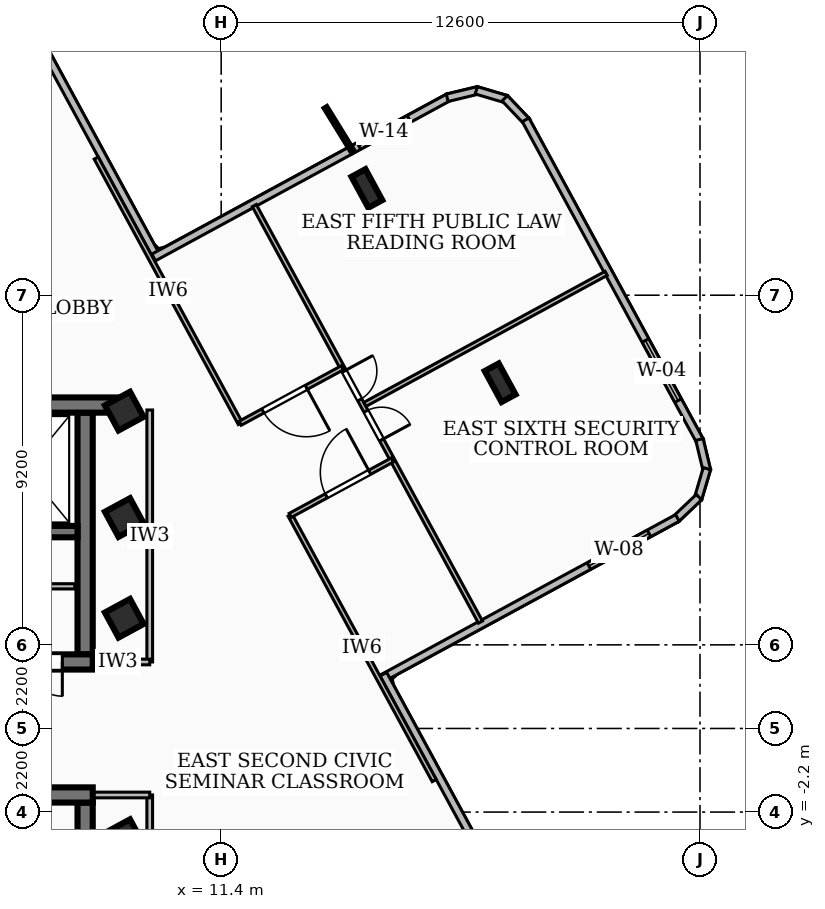
"""IFC4 building model, lengths in metres.
Left out: names, types, materials, properties, quantities, classifications, styles, units other than length and angle.
Written with IfcOpenShell. Run it as: python <this file> out.ifc"""

import sys

from ifc_helpers import new_model, si_unit, direction, frame, frame_2d, origin, origin_2d, place, context, subcontext, project, spatial, rectangle, i_section, extrude, element, fill, save


model = new_model("IFC4")
c1 = context("Model", 3, precision=1e-05, world=origin(), true_north=direction((0.0, 1.0)))
c2 = subcontext(c1, "Body", "Model", "MODEL_VIEW")
j1 = project(units=[si_unit("LENGTHUNIT", "METRE"), si_unit("PLANEANGLEUNIT", "RADIAN")], contexts=[c1])
p1 = place(None, origin())
s1 = spatial("IfcSite", under=j1, at=p1, CompositionType="ELEMENT")
p2 = place(p1, origin())
s2 = spatial("IfcBuilding", under=s1, at=p2, CompositionType="ELEMENT")
p3 = place(p2, frame((0.0, 0.0, 200.88)))
s3 = spatial("IfcBuildingStorey", under=s2, at=p3, CompositionType="ELEMENT", Elevation=200.88)
p4 = place(p3, frame((-8.78, 8.51, 0.0), z_axis=(0.0, 0.0, 1.0), x_axis=(1.0, 0.0, 0.0)))
e1 = element("IfcWall", 1, at=p4, inside=s3, PredefinedType="SHEAR", context=c2, shape_type="SweptSolid", body=[
    extrude(rectangle(XDim=17.56, YDim=0.4, at=frame_2d((8.78, 0.0))), origin(), (0.0, 0.0, 1.0), 4.06),
])
p5 = place(p3, frame((8.02, 1.75, 0.0), z_axis=(0.0, 0.0, 1.0), x_axis=(-1.0, 0.0, 0.0)))
e2 = element("IfcWall", 2, at=p5, inside=s3, PredefinedType="SHEAR", context=c2, shape_type="SweptSolid", body=[
    extrude(rectangle(XDim=16.04, YDim=0.4, at=frame_2d((8.02, 0.0))), origin(), (0.0, 0.0, 1.0), 4.06),
])
p6 = place(p5, frame((7.45, 0.0, 0.0)))
e3 = element("IfcOpeningElement", 3, at=p6, cuts=e2, PredefinedType="OPENING", context=c2, shape_type="SweptSolid", body=[
    extrude(rectangle(XDim=1.0, YDim=2.1, at=frame_2d((0.5, 1.05))), frame((0.0, 0.21, 0.0), z_axis=(0.0, -1.0, 0.0), x_axis=(1.0, 0.0, 0.0)), (0.0, 0.0, 1.0), 0.42),
])
p7 = place(p5, frame((14.285, 0.0, 0.0)))
e4 = element("IfcOpeningElement", 4, at=p7, cuts=e2, PredefinedType="OPENING", context=c2, shape_type="SweptSolid", body=[
    extrude(rectangle(XDim=1.05, YDim=2.15, at=frame_2d((0.525, 1.075))), frame((0.0, 0.21, 0.0), z_axis=(0.0, -1.0, 0.0), x_axis=(1.0, 0.0, 0.0)), (0.0, 0.0, 1.0), 0.42),
])
p8 = place(p5, frame((12.725, 0.0, 0.0)))
e5 = element("IfcOpeningElement", 5, at=p8, cuts=e2, PredefinedType="OPENING", context=c2, shape_type="SweptSolid", body=[
    extrude(rectangle(XDim=1.05, YDim=2.15, at=frame_2d((0.525, 1.075))), frame((0.0, 0.21, 0.0), z_axis=(0.0, -1.0, 0.0), x_axis=(1.0, 0.0, 0.0)), (0.0, 0.0, 1.0), 0.42),
])
p9 = place(p5, frame((11.165, 0.0, 0.0)))
e6 = element("IfcOpeningElement", 6, at=p9, cuts=e2, PredefinedType="OPENING", context=c2, shape_type="SweptSolid", body=[
    extrude(rectangle(XDim=1.05, YDim=2.15, at=frame_2d((0.525, 1.075))), frame((0.0, 0.21, 0.0), z_axis=(0.0, -1.0, 0.0), x_axis=(1.0, 0.0, 0.0)), (0.0, 0.0, 1.0), 0.42),
])
p10 = place(p5, frame((3.85, 0.0, 0.0)))
e7 = element("IfcOpeningElement", 7, at=p10, cuts=e2, PredefinedType="OPENING", context=c2, shape_type="SweptSolid", body=[
    extrude(rectangle(XDim=0.9, YDim=2.06, at=frame_2d((0.45, 1.03))), frame((0.0, 0.21, 0.0), z_axis=(0.0, -1.0, 0.0), x_axis=(1.0, 0.0, 0.0)), (0.0, 0.0, 1.0), 0.42),
])
p11 = place(p5, frame((2.35, 0.0, 0.0)))
e8 = element("IfcOpeningElement", 8, at=p11, cuts=e2, PredefinedType="OPENING", context=c2, shape_type="SweptSolid", body=[
    extrude(rectangle(XDim=0.9, YDim=2.06, at=frame_2d((0.45, 1.03))), frame((0.0, 0.21, 0.0), z_axis=(0.0, -1.0, 0.0), x_axis=(1.0, 0.0, 0.0)), (0.0, 0.0, 1.0), 0.42),
])
p12 = place(p5, frame((0.8, 0.0, 0.0)))
e9 = element("IfcOpeningElement", 9, at=p12, cuts=e2, PredefinedType="OPENING", context=c2, shape_type="SweptSolid", body=[
    extrude(rectangle(XDim=0.9, YDim=2.06, at=frame_2d((0.45, 1.03))), frame((0.0, 0.21, 0.0), z_axis=(0.0, -1.0, 0.0), x_axis=(1.0, 0.0, 0.0)), (0.0, 0.0, 1.0), 0.42),
])
p13 = place(p3, frame((7.82, 8.31, 0.0), z_axis=(0.0, 0.0, 1.0), x_axis=(0.0, -1.0, 0.0)))
e10 = element("IfcWall", 10, at=p13, inside=s3, PredefinedType="SHEAR", context=c2, shape_type="SweptSolid", body=[
    extrude(rectangle(XDim=6.36, YDim=0.4, at=frame_2d((3.18, 0.0))), origin(), (0.0, 0.0, 1.0), 4.06),
])
p14 = place(p3, frame((7.62, 5.18, 0.0), z_axis=(0.0, 0.0, 1.0), x_axis=(-1.0, 0.0, 0.0)))
e11 = element("IfcWall", 11, at=p14, inside=s3, PredefinedType="SOLIDWALL", context=c2, shape_type="SweptSolid", body=[
    extrude(rectangle(XDim=15.24, YDim=0.3, at=frame_2d((7.62, 0.0))), origin(), (0.0, 0.0, 1.0), 4.06),
])
p15 = place(p14, frame((5.77, 0.0, 0.0)))
e12 = element("IfcOpeningElement", 12, at=p15, cuts=e11, PredefinedType="OPENING", context=c2, shape_type="SweptSolid", body=[
    extrude(rectangle(XDim=1.1, YDim=2.15, at=frame_2d((0.55, 1.075))), frame((0.0, 0.16, 0.0), z_axis=(0.0, -1.0, 0.0), x_axis=(1.0, 0.0, 0.0)), (0.0, 0.0, 1.0), 0.32),
])
p16 = place(p14, frame((2.97, 0.0, 0.0)))
e13 = element("IfcOpeningElement", 13, at=p16, cuts=e11, PredefinedType="OPENING", context=c2, shape_type="SweptSolid", body=[
    extrude(rectangle(XDim=1.1, YDim=2.15, at=frame_2d((0.55, 1.075))), frame((0.0, 0.16, 0.0), z_axis=(0.0, -1.0, 0.0), x_axis=(1.0, 0.0, 0.0)), (0.0, 0.0, 1.0), 0.32),
])
p17 = place(p14, frame((7.97, 0.0, 0.0)))
e14 = element("IfcOpeningElement", 14, at=p17, cuts=e11, PredefinedType="OPENING", context=c2, shape_type="SweptSolid", body=[
    extrude(rectangle(XDim=1.0, YDim=2.1, at=frame_2d((0.5, 1.05))), frame((0.0, 0.16, 0.0), z_axis=(0.0, -1.0, 0.0), x_axis=(1.0, 0.0, 0.0)), (0.0, 0.0, 1.0), 0.32),
])
p18 = place(p3, frame((-8.02, -1.75, 0.0), z_axis=(0.0, 0.0, 1.0), x_axis=(1.0, 0.0, 0.0)))
e15 = element("IfcWall", 15, at=p18, inside=s3, PredefinedType="SHEAR", context=c2, shape_type="SweptSolid", body=[
    extrude(rectangle(XDim=16.04, YDim=0.4, at=frame_2d((8.02, 0.0))), origin(), (0.0, 0.0, 1.0), 4.06),
])
p19 = place(p18, frame((7.45, 0.0, 0.0)))
e16 = element("IfcOpeningElement", 16, at=p19, cuts=e15, PredefinedType="OPENING", context=c2, shape_type="SweptSolid", body=[
    extrude(rectangle(XDim=1.0, YDim=2.1, at=frame_2d((0.5, 1.05))), frame((0.0, 0.21, 0.0), z_axis=(0.0, -1.0, 0.0), x_axis=(1.0, 0.0, 0.0)), (0.0, 0.0, 1.0), 0.42),
])
p20 = place(p18, frame((12.65, 0.0, 0.0)))
e17 = element("IfcOpeningElement", 17, at=p20, cuts=e15, PredefinedType="OPENING", context=c2, shape_type="SweptSolid", body=[
    extrude(rectangle(XDim=0.9, YDim=2.06, at=frame_2d((0.45, 1.03))), frame((0.0, 0.21, 0.0), z_axis=(0.0, -1.0, 0.0), x_axis=(1.0, 0.0, 0.0)), (0.0, 0.0, 1.0), 0.42),
])
p21 = place(p18, frame((2.25, 0.0, 0.0)))
e18 = element("IfcOpeningElement", 18, at=p21, cuts=e15, PredefinedType="OPENING", context=c2, shape_type="SweptSolid", body=[
    extrude(rectangle(XDim=0.9, YDim=2.06, at=frame_2d((0.45, 1.03))), frame((0.0, 0.21, 0.0), z_axis=(0.0, -1.0, 0.0), x_axis=(1.0, 0.0, 0.0)), (0.0, 0.0, 1.0), 0.42),
])
p22 = place(p3, frame((7.82, -1.95, 0.0), z_axis=(0.0, 0.0, 1.0), x_axis=(0.0, -1.0, 0.0)))
e19 = element("IfcWall", 19, at=p22, inside=s3, PredefinedType="SHEAR", context=c2, shape_type="SweptSolid", body=[
    extrude(rectangle(XDim=6.36, YDim=0.4, at=frame_2d((3.18, 0.0))), origin(), (0.0, 0.0, 1.0), 4.06),
])
for number, where, z_axis, x_axis in (
    (20, (8.85, -2.9, 0.0), (0.0, 0.0, 1.0), (0.879, 0.477, 0.0)),
    (21, (8.85, 2.9, 0.0), (0.0, 0.0, 1.0), (0.879, 0.477, 0.0)),
    (22, (8.85, 5.55, 0.0), (0.0, 0.0, 1.0), (0.879, 0.477, 0.0)),
    (23, (8.85, 8.35, 0.0), (0.0, 0.0, 1.0), (0.879, 0.477, 0.0)),
):
    element("IfcColumn", number, at=place(p3, frame(where, z_axis=z_axis, x_axis=x_axis)), inside=s3, PredefinedType="COLUMN", context=c2, shape_type="SweptSolid", body=[
        extrude(rectangle(XDim=0.75, YDim=0.75, at=origin_2d()), origin(), (0.0, 0.0, 1.0), 4.32),
    ])
for number, where, z_axis, x_axis in (
    (24, (18.741, 9.097, 0.0), (0.0, 0.0, 1.0), (0.879, 0.477, 0.0)),
    (25, (15.234, 14.209, 0.0), (0.0, 0.0, 1.0), (0.879, 0.477, 0.0)),
):
    element("IfcColumn", number, at=place(p3, frame(where, z_axis=z_axis, x_axis=x_axis)), inside=s3, PredefinedType="COLUMN", context=c2, shape_type="SweptSolid", body=[
        extrude(i_section(OverallWidth=0.418, OverallDepth=0.927, WebThickness=0.019, FlangeThickness=0.032, at=origin_2d()), origin(), (0.0, 0.0, 1.0), 4.32),
    ])
p23 = place(p3, frame((6.514, 18.286, 0.0), z_axis=(0.0, 0.0, 1.0), x_axis=(0.477174172682, -0.878808744224, 0.0)))
e26 = element("IfcWall", 26, at=p23, inside=s3, PredefinedType="SOLIDWALL", context=c2, shape_type="SweptSolid", body=[
    extrude(rectangle(XDim=6.742, YDim=0.2, at=frame_2d((3.371, 0.0))), origin(), (0.0, 0.0, 1.0), 4.06),
])
p24 = place(p3, frame((9.623, 12.393, 0.0), z_axis=(0.0, 0.0, 1.0), x_axis=(0.878806785067, 0.477177780832, 0.0)))
e27 = element("IfcWall", 27, at=p24, inside=s3, PredefinedType="SOLIDWALL", context=c2, shape_type="SweptSolid", body=[
    extrude(rectangle(XDim=8.842, YDim=0.2, at=frame_2d((4.421, 0.0))), origin(), (0.0, 0.0, 1.0), 4.06),
])
p25 = place(p24, frame((6.146, 0.0, 0.85)))
e28 = element("IfcOpeningElement", 28, at=p25, cuts=e27, PredefinedType="OPENING", context=c2, shape_type="SweptSolid", body=[
    extrude(rectangle(XDim=1.5, YDim=1.5, at=frame_2d((0.75, 0.75))), frame((0.0, 0.11, 0.0), z_axis=(0.0, -1.0, 0.0), x_axis=(1.0, 0.0, 0.0)), (0.0, 0.0, 1.0), 0.22),
])
p26 = place(p3, frame((17.347, 16.594, 0.0), z_axis=(0.0, 0.0, 1.0), x_axis=(0.972199055992, 0.234155921404, 0.0)))
e29 = element("IfcWall", 29, at=p26, inside=s3, PredefinedType="SOLIDWALL", context=c2, shape_type="SweptSolid", body=[
    extrude(rectangle(XDim=0.837, YDim=0.2, at=frame_2d((0.418, 0.0))), origin(), (0.0, 0.0, 1.0), 4.06),
])
p27 = place(p3, frame((18.113, 16.791, 0.0), z_axis=(0.0, 0.0, 1.0), x_axis=(0.95887868602, -0.283816253053, 0.0)))
e30 = element("IfcWall", 30, at=p27, inside=s3, PredefinedType="SOLIDWALL", context=c2, shape_type="SweptSolid", body=[
    extrude(rectangle(XDim=0.825, YDim=0.2, at=frame_2d((0.413, 0.0))), origin(), (0.0, 0.0, 1.0), 4.06),
])
p28 = place(p3, frame((18.863, 16.582, 0.0), z_axis=(0.0, 0.0, 1.0), x_axis=(0.688948659988, -0.724810143348, 0.0)))
e31 = element("IfcWall", 31, at=p28, inside=s3, PredefinedType="SOLIDWALL", context=c2, shape_type="SweptSolid", body=[
    extrude(rectangle(XDim=0.837, YDim=0.2, at=frame_2d((0.419, 0.0))), origin(), (0.0, 0.0, 1.0), 4.06),
])
p29 = place(p3, frame((19.411, 16.015, 0.0), z_axis=(0.0, 0.0, 1.0), x_axis=(0.477136087368, -0.878829422659, 0.0)))
e32 = element("IfcWall", 32, at=p29, inside=s3, PredefinedType="SOLIDWALL", context=c2, shape_type="SweptSolid", body=[
    extrude(rectangle(XDim=9.624, YDim=0.2, at=frame_2d((4.812, 0.0))), origin(), (0.0, 0.0, 1.0), 4.06),
])
p30 = place(p29, frame((6.607, 0.0, 0.85)))
e33 = element("IfcOpeningElement", 33, at=p30, cuts=e32, PredefinedType="OPENING", context=c2, shape_type="SweptSolid", body=[
    extrude(rectangle(XDim=1.8, YDim=2.0, at=frame_2d((0.9, 1.0))), frame((0.0, 0.11, 0.0), z_axis=(0.0, -1.0, 0.0), x_axis=(1.0, 0.0, 0.0)), (0.0, 0.0, 1.0), 0.22),
])
p31 = place(p3, frame((23.985, 7.603, 0.0), z_axis=(0.0, 0.0, 1.0), x_axis=(0.233880279999, -0.972265403389, 0.0)))
e34 = element("IfcWall", 34, at=p31, inside=s3, PredefinedType="SOLIDWALL", context=c2, shape_type="SweptSolid", body=[
    extrude(rectangle(XDim=0.837, YDim=0.2, at=frame_2d((0.418, 0.0))), origin(), (0.0, 0.0, 1.0), 4.06),
])
p32 = place(p3, frame((24.182, 6.837, 0.0), z_axis=(0.0, 0.0, 1.0), x_axis=(-0.283544107847, -0.958959195641, 0.0)))
e35 = element("IfcWall", 35, at=p32, inside=s3, PredefinedType="SOLIDWALL", context=c2, shape_type="SweptSolid", body=[
    extrude(rectangle(XDim=0.825, YDim=0.2, at=frame_2d((0.413, 0.0))), origin(), (0.0, 0.0, 1.0), 4.06),
])
p33 = place(p3, frame((23.973, 6.087, 0.0), z_axis=(0.0, 0.0, 1.0), x_axis=(-0.725362992084, -0.688366566384, 0.0)))
e36 = element("IfcWall", 36, at=p33, inside=s3, PredefinedType="SOLIDWALL", context=c2, shape_type="SweptSolid", body=[
    extrude(rectangle(XDim=0.838, YDim=0.2, at=frame_2d((0.419, 0.0))), origin(), (0.0, 0.0, 1.0), 4.06),
])
p34 = place(p3, frame((23.405, 5.539, 0.0), z_axis=(0.0, 0.0, 1.0), x_axis=(-0.878806785067, -0.477177780832, 0.0)))
e37 = element("IfcWall", 37, at=p34, inside=s3, PredefinedType="SOLIDWALL", context=c2, shape_type="SweptSolid", body=[
    extrude(rectangle(XDim=8.842, YDim=0.2, at=frame_2d((4.421, 0.0))), origin(), (0.0, 0.0, 1.0), 4.06),
])
p35 = place(p34, frame((0.85, 0.0, 0.85)))
e38 = element("IfcOpeningElement", 38, at=p35, cuts=e37, PredefinedType="OPENING", context=c2, shape_type="SweptSolid", body=[
    extrude(rectangle(XDim=1.8, YDim=1.8, at=frame_2d((0.9, 0.9))), frame((0.0, 0.11, 0.0), z_axis=(0.0, -1.0, 0.0), x_axis=(1.0, 0.0, 0.0)), (0.0, 0.0, 1.0), 0.22),
])
p36 = place(p3, frame((15.667, 1.428, 0.0), z_axis=(0.0, 0.0, 1.0), x_axis=(0.477219733162, -0.878784004338, 0.0)))
e39 = element("IfcWall", 39, at=p36, inside=s3, PredefinedType="SOLIDWALL", context=c2, shape_type="SweptSolid", body=[
    extrude(rectangle(XDim=6.741, YDim=0.2, at=frame_2d((3.371, 0.0))), origin(), (0.0, 0.0, 1.0), 4.06),
])
p37 = place(p3, frame((2.9, 3.74, 0.0), z_axis=(0.0, 0.0, 1.0), x_axis=(1.0, 0.0, 0.0)))
e40 = element("IfcWall", 40, at=p37, inside=s3, PredefinedType="PARTITIONING", context=c2, shape_type="SweptSolid", body=[
    extrude(rectangle(XDim=4.65, YDim=0.138, at=frame_2d((2.325, 0.0))), origin(), (0.0, 0.0, 1.0), 4.06),
])
p38 = place(p3, frame((9.52, 1.75, 0.0), z_axis=(0.0, 0.0, 1.0), x_axis=(0.0, 1.0, 0.0)))
e41 = element("IfcWall", 41, at=p38, inside=s3, PredefinedType="PARTITIONING", context=c2, shape_type="SweptSolid", body=[
    extrude(rectangle(XDim=6.63, YDim=0.15, at=frame_2d((3.315, 0.0))), origin(), (0.0, 0.0, 1.0), 3.43),
])
p39 = place(p3, frame((7.85, 1.75, 0.0), z_axis=(0.0, 0.0, 1.0), x_axis=(1.0, 0.0, 0.0)))
e42 = element("IfcWall", 42, at=p39, inside=s3, PredefinedType="PARTITIONING", context=c2, shape_type="SweptSolid", body=[
    extrude(rectangle(XDim=1.67, YDim=0.15, at=frame_2d((0.835, 0.0))), origin(), (0.0, 0.0, 1.0), 3.29),
])
p40 = place(p3, frame((9.52, -8.38, 0.0), z_axis=(0.0, 0.0, 1.0), x_axis=(0.0, 1.0, 0.0)))
e43 = element("IfcWall", 43, at=p40, inside=s3, PredefinedType="PARTITIONING", context=c2, shape_type="SweptSolid", body=[
    extrude(rectangle(XDim=6.63, YDim=0.15, at=frame_2d((3.315, 0.0))), origin(), (0.0, 0.0, 1.0), 4.06),
])
p41 = place(p3, frame((7.85, -1.75, 0.0), z_axis=(0.0, 0.0, 1.0), x_axis=(1.0, 0.0, 0.0)))
e44 = element("IfcWall", 44, at=p41, inside=s3, PredefinedType="PARTITIONING", context=c2, shape_type="SweptSolid", body=[
    extrude(rectangle(XDim=1.67, YDim=0.15, at=frame_2d((0.835, 0.0))), origin(), (0.0, 0.0, 1.0), 3.29),
])
p42 = place(p3, frame((11.905, 8.023, 0.0), z_axis=(0.0, 0.0, 1.0), x_axis=(-0.477237565532, 0.878774320315, 0.0)))
e45 = element("IfcWall", 45, at=p42, inside=s3, PredefinedType="PARTITIONING", context=c2, shape_type="SweptSolid", body=[
    extrude(rectangle(XDim=7.95, YDim=0.12, at=frame_2d((3.975, 0.0))), origin(), (0.0, 0.0, 1.0), 3.43),
])
p43 = place(p3, frame((17.006, -1.372, 0.0), z_axis=(0.0, 0.0, 1.0), x_axis=(-0.477209766936, 0.878789416379, 0.0)))
e46 = element("IfcWall", 46, at=p43, inside=s3, PredefinedType="PARTITIONING", context=c2, shape_type="SweptSolid", body=[
    extrude(rectangle(XDim=7.951, YDim=0.12, at=frame_2d((3.975, 0.0))), origin(), (0.0, 0.0, 1.0), 4.06),
])
p44 = place(p3, frame((14.589, 9.491, 0.0), z_axis=(0.0, 0.0, 1.0), x_axis=(-0.878839093996, -0.477118273454, 0.0)))
e47 = element("IfcWall", 47, at=p44, inside=s3, PredefinedType="PARTITIONING", context=c2, shape_type="SweptSolid", body=[
    extrude(rectangle(XDim=3.06, YDim=0.12, at=frame_2d((1.53, 0.0))), origin(), (0.0, 0.0, 1.0), 3.43),
])
p45 = place(p44, frame((1.08, 0.0, 0.0)))
e48 = element("IfcOpeningElement", 48, at=p45, cuts=e47, PredefinedType="OPENING", context=c2, shape_type="SweptSolid", body=[
    extrude(rectangle(XDim=1.3, YDim=2.1, at=frame_2d((0.65, 1.05))), frame((0.0, 0.07, 0.0), z_axis=(0.0, -1.0, 0.0), x_axis=(1.0, 0.0, 0.0)), (0.0, 0.0, 1.0), 0.14),
])
p46 = place(p3, frame((13.217, 5.606, 0.0), z_axis=(0.0, 0.0, 1.0), x_axis=(0.87882092953, 0.477151730397, 0.0)))
e49 = element("IfcWall", 49, at=p46, inside=s3, PredefinedType="PARTITIONING", context=c2, shape_type="SweptSolid", body=[
    extrude(rectangle(XDim=3.06, YDim=0.12, at=frame_2d((1.53, 0.0))), origin(), (0.0, 0.0, 1.0), 4.06),
])
p47 = place(p46, frame((1.08, 0.0, 0.0)))
e50 = element("IfcOpeningElement", 50, at=p47, cuts=e49, PredefinedType="OPENING", context=c2, shape_type="SweptSolid", body=[
    extrude(rectangle(XDim=1.3, YDim=2.1, at=frame_2d((0.65, 1.05))), frame((0.0, 0.07, 0.0), z_axis=(0.0, -1.0, 0.0), x_axis=(1.0, 0.0, 0.0)), (0.0, 0.0, 1.0), 0.14),
])
p48 = place(p3, frame((15.181, 8.527, 0.0), z_axis=(0.0, 0.0, 1.0), x_axis=(0.878776100726, 0.477234287109, 0.0)))
e51 = element("IfcWall", 51, at=p48, inside=s3, PredefinedType="PARTITIONING", context=c2, shape_type="SweptSolid", body=[
    extrude(rectangle(XDim=7.225, YDim=0.12, at=frame_2d((3.612, 0.0))), origin(), (0.0, 0.0, 1.0), 3.43),
])
p49 = place(p3, frame((12.272, 13.758, 0.0), z_axis=(0.0, 0.0, 1.0), x_axis=(0.477201164774, -0.878794087564, 0.0)))
e52 = element("IfcWall", 52, at=p49, inside=s3, PredefinedType="PARTITIONING", context=c2, shape_type="SweptSolid", body=[
    extrude(rectangle(XDim=12.47, YDim=0.12, at=frame_2d((6.235, 0.0))), origin(), (0.0, 0.0, 1.0), 3.43),
])
p50 = place(p49, frame((6.155, 0.0, 0.0)))
e53 = element("IfcOpeningElement", 53, at=p50, cuts=e52, PredefinedType="OPENING", context=c2, shape_type="SweptSolid", body=[
    extrude(rectangle(XDim=0.86, YDim=2.04, at=frame_2d((0.43, 1.02))), frame((0.0, 0.07, 0.0), z_axis=(0.0, -1.0, 0.0), x_axis=(1.0, 0.0, 0.0)), (0.0, 0.0, 1.0), 0.14),
])
p51 = place(p49, frame((4.955, 0.0, 0.0)))
e54 = element("IfcOpeningElement", 54, at=p51, cuts=e52, PredefinedType="OPENING", context=c2, shape_type="SweptSolid", body=[
    extrude(rectangle(XDim=0.86, YDim=2.04, at=frame_2d((0.43, 1.02))), frame((0.0, 0.07, 0.0), z_axis=(0.0, -1.0, 0.0), x_axis=(1.0, 0.0, 0.0)), (0.0, 0.0, 1.0), 0.14),
])
p52 = place(p25, origin())
e55 = element("IfcWindow", 55, at=p52, inside=s3, PartitioningType="SINGLE_PANEL", PredefinedType="WINDOW", context=c2, shape_type="SweptSolid", body=[
    extrude(rectangle(XDim=1.5, YDim=1.5, at=frame_2d((0.75, 0.75))), frame((0.0, 0.03, 0.0), z_axis=(0.0, -1.0, 0.0), x_axis=(1.0, 0.0, 0.0)), (0.0, 0.0, 1.0), 0.06),
])
fill(e28, e55)
p53 = place(p30, origin())
e56 = element("IfcWindow", 56, at=p53, inside=s3, PartitioningType="SINGLE_PANEL", PredefinedType="WINDOW", context=c2, shape_type="SweptSolid", body=[
    extrude(rectangle(XDim=1.8, YDim=2.0, at=frame_2d((0.9, 1.0))), frame((0.0, 0.03, 0.0), z_axis=(0.0, -1.0, 0.0), x_axis=(1.0, 0.0, 0.0)), (0.0, 0.0, 1.0), 0.06),
])
fill(e33, e56)
p54 = place(p35, origin())
e57 = element("IfcWindow", 57, at=p54, inside=s3, PartitioningType="SINGLE_PANEL", PredefinedType="WINDOW", context=c2, shape_type="SweptSolid", body=[
    extrude(rectangle(XDim=1.8, YDim=1.8, at=frame_2d((0.9, 0.9))), frame((0.0, 0.03, 0.0), z_axis=(0.0, -1.0, 0.0), x_axis=(1.0, 0.0, 0.0)), (0.0, 0.0, 1.0), 0.06),
])
fill(e38, e57)
p55 = place(p12, origin())
e58 = element("IfcDoor", 58, at=p55, inside=s3, OperationType="SINGLE_SWING_LEFT", PredefinedType="DOOR", context=c2, shape_type="SweptSolid", body=[
    extrude(rectangle(XDim=0.9, YDim=2.06, at=frame_2d((0.45, 1.03))), frame((0.0, 0.025, 0.0), z_axis=(0.0, -1.0, 0.0), x_axis=(1.0, 0.0, 0.0)), (0.0, 0.0, 1.0), 0.05),
])
fill(e9, e58)
p56 = place(p45, origin())
e59 = element("IfcDoor", 59, at=p56, inside=s3, OperationType="SINGLE_SWING_LEFT", PredefinedType="DOOR", context=c2, shape_type="SweptSolid", body=[
    extrude(rectangle(XDim=1.3, YDim=2.1, at=frame_2d((0.65, 1.05))), frame((0.0, 0.025, 0.0), z_axis=(0.0, -1.0, 0.0), x_axis=(1.0, 0.0, 0.0)), (0.0, 0.0, 1.0), 0.05),
])
fill(e48, e59)
p57 = place(p47, origin())
e60 = element("IfcDoor", 60, at=p57, inside=s3, OperationType="SINGLE_SWING_RIGHT", PredefinedType="DOOR", context=c2, shape_type="SweptSolid", body=[
    extrude(rectangle(XDim=1.3, YDim=2.1, at=frame_2d((0.65, 1.05))), frame((0.0, 0.025, 0.0), z_axis=(0.0, -1.0, 0.0), x_axis=(1.0, 0.0, 0.0)), (0.0, 0.0, 1.0), 0.05),
])
fill(e50, e60)
p58 = place(p50, origin())
e61 = element("IfcDoor", 61, at=p58, inside=s3, OperationType="SINGLE_SWING_RIGHT", PredefinedType="DOOR", context=c2, shape_type="SweptSolid", body=[
    extrude(rectangle(XDim=0.86, YDim=2.04, at=frame_2d((0.43, 1.02))), frame((0.0, 0.025, 0.0), z_axis=(0.0, -1.0, 0.0), x_axis=(1.0, 0.0, 0.0)), (0.0, 0.0, 1.0), 0.05),
])
fill(e53, e61)
p59 = place(p51, origin())
e62 = element("IfcDoor", 62, at=p59, inside=s3, OperationType="SINGLE_SWING_LEFT", PredefinedType="DOOR", context=c2, shape_type="SweptSolid", body=[
    extrude(rectangle(XDim=0.86, YDim=2.04, at=frame_2d((0.43, 1.02))), frame((0.0, 0.025, 0.0), z_axis=(0.0, -1.0, 0.0), x_axis=(1.0, 0.0, 0.0)), (0.0, 0.0, 1.0), 0.05),
])
fill(e54, e62)
save(model, sys.argv[1])
